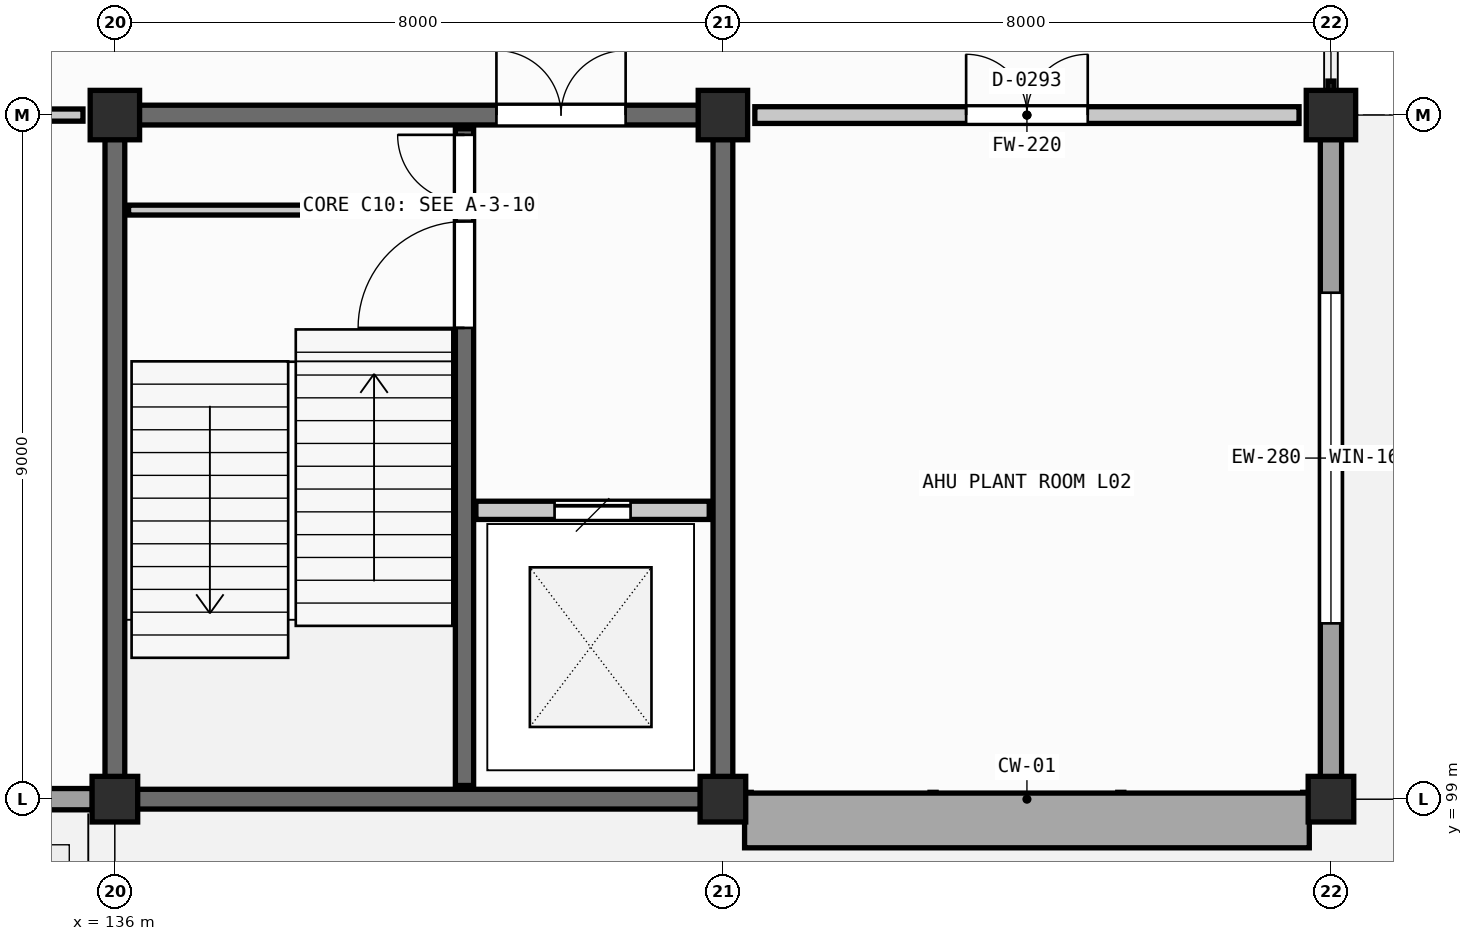
"""IFC4 building model, lengths in metres.
Left out: names, types, materials, properties, quantities, classifications, styles, units other than length and angle.
Written with IfcOpenShell. Run it as: python <this file> out.ifc"""

import sys

from ifc_helpers import new_model, si_unit, direction, frame, frame_2d, origin, origin_2d, place, context, subcontext, project, spatial, rectangle, extrude, element, fill, save


model = new_model("IFC4")
c1 = context("Model", 3, precision=1e-05, world=origin(), true_north=direction((0.0, 1.0)))
c2 = subcontext(c1, "Body", "Model", "MODEL_VIEW")
j1 = project(units=[si_unit("LENGTHUNIT", "METRE"), si_unit("PLANEANGLEUNIT", "RADIAN")], contexts=[c1])
p1 = place(None, origin())
s1 = spatial("IfcSite", under=j1, at=p1, CompositionType="ELEMENT")
p2 = place(p1, origin())
s2 = spatial("IfcBuilding", under=s1, at=p2, CompositionType="ELEMENT")
p3 = place(p2, frame((0.0, 0.0, 9.0)))
s3 = spatial("IfcBuildingStorey", under=s2, at=p3, CompositionType="ELEMENT", Elevation=9.0)
p4 = place(p3, frame((136.0, 99.0, 0.0), z_axis=(0.0, 0.0, 1.0), x_axis=(1.0, 0.0, 0.0)))
e1 = element("IfcColumn", 1, at=p4, inside=s3, PredefinedType="COLUMN", context=c2, shape_type="SweptSolid", body=[
    extrude(rectangle(XDim=0.6, YDim=0.6, at=origin_2d()), origin(), (0.0, 0.0, 1.0), 4.2),
])
p5 = place(p3, frame((136.0, 108.0, 0.0), z_axis=(0.0, 0.0, 1.0), x_axis=(1.0, 0.0, 0.0)))
e2 = element("IfcColumn", 2, at=p5, inside=s3, PredefinedType="COLUMN", context=c2, shape_type="SweptSolid", body=[
    extrude(rectangle(XDim=0.65, YDim=0.65, at=origin_2d()), origin(), (0.0, 0.0, 1.0), 4.2),
])
p6 = place(p3, frame((144.0, 99.0, 0.0), z_axis=(0.0, 0.0, 1.0), x_axis=(1.0, 0.0, 0.0)))
e3 = element("IfcColumn", 3, at=p6, inside=s3, PredefinedType="COLUMN", context=c2, shape_type="SweptSolid", body=[
    extrude(rectangle(XDim=0.6, YDim=0.6, at=origin_2d()), origin(), (0.0, 0.0, 1.0), 4.2),
])
p7 = place(p3, frame((144.0, 108.0, 0.0), z_axis=(0.0, 0.0, 1.0), x_axis=(1.0, 0.0, 0.0)))
e4 = element("IfcColumn", 4, at=p7, inside=s3, PredefinedType="COLUMN", context=c2, shape_type="SweptSolid", body=[
    extrude(rectangle(XDim=0.65, YDim=0.65, at=origin_2d()), origin(), (0.0, 0.0, 1.0), 4.2),
])
p8 = place(p3, frame((152.0, 99.0, 0.0), z_axis=(0.0, 0.0, 1.0), x_axis=(1.0, 0.0, 0.0)))
e5 = element("IfcColumn", 5, at=p8, inside=s3, PredefinedType="COLUMN", context=c2, shape_type="SweptSolid", body=[
    extrude(rectangle(XDim=0.6, YDim=0.6, at=origin_2d()), origin(), (0.0, 0.0, 1.0), 4.2),
])
p9 = place(p3, frame((152.0, 108.0, 0.0), z_axis=(0.0, 0.0, 1.0), x_axis=(1.0, 0.0, 0.0)))
e6 = element("IfcColumn", 6, at=p9, inside=s3, PredefinedType="COLUMN", context=c2, shape_type="SweptSolid", body=[
    extrude(rectangle(XDim=0.65, YDim=0.65, at=origin_2d()), origin(), (0.0, 0.0, 1.0), 4.2),
])
p10 = place(p3, frame((128.695, 99.0, 0.0), z_axis=(0.0, 0.0, 1.0), x_axis=(1.0, 0.0, 0.0)))
e7 = element("IfcWall", 7, at=p10, inside=s3, PredefinedType="SOLIDWALL", context=c2, shape_type="SweptSolid", body=[
    extrude(rectangle(XDim=7.01, YDim=0.28, at=frame_2d((3.505, 0.0))), origin(), (0.0, 0.0, 1.0), 3.05),
])
p11 = place(p10, frame((2.68, 0.0, 0.0)))
e8 = element("IfcOpeningElement", 8, at=p11, cuts=e7, PredefinedType="OPENING", context=c2, shape_type="SweptSolid", body=[
    extrude(rectangle(XDim=1.65, YDim=2.2, at=frame_2d((0.825, 1.1))), frame((0.0, 0.15, 0.0), z_axis=(0.0, -1.0, 0.0), x_axis=(1.0, 0.0, 0.0)), (0.0, 0.0, 1.0), 0.3),
])
p12 = place(p3, frame((152.0, 99.295, 0.0), z_axis=(0.0, 0.0, 1.0), x_axis=(0.0, 1.0, 0.0)))
e9 = element("IfcWall", 9, at=p12, inside=s3, PredefinedType="SOLIDWALL", context=c2, shape_type="SweptSolid", body=[
    extrude(rectangle(XDim=8.385, YDim=0.28, at=frame_2d((4.192, 0.0))), origin(), (0.0, 0.0, 1.0), 3.05),
])
p13 = place(p12, frame((2.018, 0.0, 1.0)))
e10 = element("IfcOpeningElement", 10, at=p13, cuts=e9, PredefinedType="OPENING", context=c2, shape_type="SweptSolid", body=[
    extrude(rectangle(XDim=4.35, YDim=1.45, at=frame_2d((2.175, 0.725))), frame((0.0, 0.15, 0.0), z_axis=(0.0, -1.0, 0.0), x_axis=(1.0, 0.0, 0.0)), (0.0, 0.0, 1.0), 0.3),
])
p14 = place(p3, frame((136.295, 99.0, 0.0), z_axis=(0.0, 0.0, 1.0), x_axis=(1.0, 0.0, 0.0)))
e11 = element("IfcWall", 11, at=p14, inside=s3, PredefinedType="SHEAR", context=c2, shape_type="SweptSolid", body=[
    extrude(rectangle(XDim=7.41, YDim=0.26, at=frame_2d((3.705, 0.0))), origin(), (0.0, 0.0, 1.0), 3.985),
])
p15 = place(p3, frame((136.32, 108.0, 0.0), z_axis=(0.0, 0.0, 1.0), x_axis=(1.0, 0.0, 0.0)))
e12 = element("IfcWall", 12, at=p15, inside=s3, PredefinedType="SHEAR", context=c2, shape_type="SweptSolid", body=[
    extrude(rectangle(XDim=7.36, YDim=0.26, at=frame_2d((3.68, 0.0))), origin(), (0.0, 0.0, 1.0), 3.985),
])
p16 = place(p15, frame((4.7, 0.0, 0.0)))
e13 = element("IfcOpeningElement", 13, at=p16, cuts=e12, PredefinedType="OPENING", context=c2, shape_type="SweptSolid", body=[
    extrude(rectangle(XDim=1.7, YDim=2.25, at=frame_2d((0.85, 1.125))), frame((0.0, 0.14, 0.0), z_axis=(0.0, -1.0, 0.0), x_axis=(1.0, 0.0, 0.0)), (0.0, 0.0, 1.0), 0.28),
])
for number, where, z_axis, x_axis in (
    (14, (136.0, 99.295, 0.0), (0.0, 0.0, 1.0), (0.0, 1.0, 0.0)),
    (15, (144.0, 99.295, 0.0), (0.0, 0.0, 1.0), (0.0, 1.0, 0.0)),
):
    element("IfcWall", number, at=place(p3, frame(where, z_axis=z_axis, x_axis=x_axis)), inside=s3, PredefinedType="SHEAR", context=c2, shape_type="SweptSolid", body=[
        extrude(rectangle(XDim=8.385, YDim=0.26, at=frame_2d((4.192, 0.0))), origin(), (0.0, 0.0, 1.0), 3.985),
    ])
p17 = place(p3, frame((140.6, 99.18, 0.0), z_axis=(0.0, 0.0, 1.0), x_axis=(0.0, 1.0, 0.0)))
e16 = element("IfcWall", 16, at=p17, inside=s3, PredefinedType="SHEAR", context=c2, shape_type="SweptSolid", body=[
    extrude(rectangle(XDim=8.64, YDim=0.24, at=frame_2d((4.32, 0.0))), origin(), (0.0, 0.0, 1.0), 3.985),
])
p18 = place(p17, frame((6.02, 0.0, 0.0)))
e17 = element("IfcOpeningElement", 17, at=p18, cuts=e16, PredefinedType="OPENING", context=c2, shape_type="SweptSolid", body=[
    extrude(rectangle(XDim=1.4, YDim=2.2, at=frame_2d((0.7, 1.1))), frame((0.0, 0.13, 0.0), z_axis=(0.0, -1.0, 0.0), x_axis=(1.0, 0.0, 0.0)), (0.0, 0.0, 1.0), 0.26),
])
p19 = place(p17, frame((7.68, 0.0, 0.0)))
e18 = element("IfcOpeningElement", 18, at=p19, cuts=e16, PredefinedType="OPENING", context=c2, shape_type="SweptSolid", body=[
    extrude(rectangle(XDim=0.88, YDim=2.02, at=frame_2d((0.44, 1.01))), frame((0.0, 0.13, 0.0), z_axis=(0.0, -1.0, 0.0), x_axis=(1.0, 0.0, 0.0)), (0.0, 0.0, 1.0), 0.26),
])
p20 = place(p3, frame((136.18, 106.75, 0.0), z_axis=(0.0, 0.0, 1.0), x_axis=(1.0, 0.0, 0.0)))
e19 = element("IfcWall", 19, at=p20, inside=s3, PredefinedType="PARTITIONING", context=c2, shape_type="SweptSolid", body=[
    extrude(rectangle(XDim=4.28, YDim=0.13, at=frame_2d((2.14, 0.0))), origin(), (0.0, 0.0, 1.0), 3.335),
])
p21 = place(p3, frame((140.75, 102.8, 0.0), z_axis=(0.0, 0.0, 1.0), x_axis=(1.0, 0.0, 0.0)))
e20 = element("IfcWall", 20, at=p21, inside=s3, PredefinedType="SHEAR", context=c2, shape_type="SweptSolid", body=[
    extrude(rectangle(XDim=3.07, YDim=0.24, at=frame_2d((1.535, 0.0))), origin(), (0.0, 0.0, 1.0), 3.335),
])
p22 = place(p21, frame((1.035, 0.0, 0.0)))
e21 = element("IfcOpeningElement", 21, at=p22, cuts=e20, PredefinedType="OPENING", context=c2, shape_type="SweptSolid", body=[
    extrude(rectangle(XDim=1.0, YDim=2.15, at=frame_2d((0.5, 1.075))), frame((0.0, 0.13, 0.0), z_axis=(0.0, -1.0, 0.0), x_axis=(1.0, 0.0, 0.0)), (0.0, 0.0, 1.0), 0.26),
])
p23 = place(p3, frame((128.82, 108.0, 0.0), z_axis=(0.0, 0.0, 1.0), x_axis=(1.0, 0.0, 0.0)))
e22 = element("IfcWall", 22, at=p23, inside=s3, PredefinedType="PARTITIONING", context=c2, shape_type="SweptSolid", body=[
    extrude(rectangle(XDim=6.76, YDim=0.16, at=frame_2d((3.38, 0.0))), origin(), (0.0, 0.0, 1.0), 3.05),
])
p24 = place(p23, frame((2.63, 0.0, 0.0)))
e23 = element("IfcOpeningElement", 23, at=p24, cuts=e22, PredefinedType="OPENING", context=c2, shape_type="SweptSolid", body=[
    extrude(rectangle(XDim=1.5, YDim=2.15, at=frame_2d((0.75, 1.075))), frame((0.0, 0.09, 0.0), z_axis=(0.0, -1.0, 0.0), x_axis=(1.0, 0.0, 0.0)), (0.0, 0.0, 1.0), 0.18),
])
p25 = place(p3, frame((144.42, 108.0, 0.0), z_axis=(0.0, 0.0, 1.0), x_axis=(1.0, 0.0, 0.0)))
e24 = element("IfcWall", 24, at=p25, inside=s3, PredefinedType="SOLIDWALL", context=c2, shape_type="SweptSolid", body=[
    extrude(rectangle(XDim=7.16, YDim=0.22, at=frame_2d((3.58, 0.0))), origin(), (0.0, 0.0, 1.0), 3.05),
])
p26 = place(p25, frame((2.78, 0.0, 0.0)))
e25 = element("IfcOpeningElement", 25, at=p26, cuts=e24, PredefinedType="OPENING", context=c2, shape_type="SweptSolid", body=[
    extrude(rectangle(XDim=1.6, YDim=2.28, at=frame_2d((0.8, 1.14))), frame((0.0, 0.12, 0.0), z_axis=(0.0, -1.0, 0.0), x_axis=(1.0, 0.0, 0.0)), (0.0, 0.0, 1.0), 0.24),
])
p27 = place(p13, origin())
e26 = element("IfcWindow", 26, at=p27, inside=s3, PartitioningType="SINGLE_PANEL", PredefinedType="WINDOW", context=c2, shape_type="SweptSolid", body=[
    extrude(rectangle(XDim=4.35, YDim=1.45, at=frame_2d((2.175, 0.725))), frame((0.0, 0.03, 0.0), z_axis=(0.0, -1.0, 0.0), x_axis=(1.0, 0.0, 0.0)), (0.0, 0.0, 1.0), 0.06),
])
fill(e10, e26)
p28 = place(p18, origin())
e27 = element("IfcDoor", 27, at=p28, inside=s3, OperationType="SINGLE_SWING_LEFT", PredefinedType="DOOR", context=c2, shape_type="SweptSolid", body=[
    extrude(rectangle(XDim=1.4, YDim=2.2, at=frame_2d((0.7, 1.1))), frame((0.0, 0.025, 0.0), z_axis=(0.0, -1.0, 0.0), x_axis=(1.0, 0.0, 0.0)), (0.0, 0.0, 1.0), 0.05),
])
fill(e17, e27)
p29 = place(p19, origin())
e28 = element("IfcDoor", 28, at=p29, inside=s3, OperationType="SINGLE_SWING_RIGHT", PredefinedType="DOOR", context=c2, shape_type="SweptSolid", body=[
    extrude(rectangle(XDim=0.88, YDim=2.02, at=frame_2d((0.44, 1.01))), frame((0.0, 0.025, 0.0), z_axis=(0.0, -1.0, 0.0), x_axis=(1.0, 0.0, 0.0)), (0.0, 0.0, 1.0), 0.05),
])
fill(e18, e28)
p30 = place(p16, origin())
e29 = element("IfcDoor", 29, at=p30, inside=s3, OperationType="DOUBLE_DOOR_SINGLE_SWING", PredefinedType="DOOR", context=c2, shape_type="SweptSolid", body=[
    extrude(rectangle(XDim=1.7, YDim=2.25, at=frame_2d((0.85, 1.125))), frame((0.0, 0.025, 0.0), z_axis=(0.0, -1.0, 0.0), x_axis=(1.0, 0.0, 0.0)), (0.0, 0.0, 1.0), 0.05),
])
fill(e13, e29)
p31 = place(p22, origin())
e30 = element("IfcDoor", 30, at=p31, inside=s3, OperationType="SLIDING_TO_LEFT", PredefinedType="DOOR", context=c2, shape_type="SweptSolid", body=[
    extrude(rectangle(XDim=1.0, YDim=2.15, at=frame_2d((0.5, 1.075))), frame((0.0, 0.025, 0.0), z_axis=(0.0, -1.0, 0.0), x_axis=(1.0, 0.0, 0.0)), (0.0, 0.0, 1.0), 0.05),
])
fill(e21, e30)
p32 = place(p26, origin())
e31 = element("IfcDoor", 31, at=p32, inside=s3, OperationType="DOUBLE_DOOR_SINGLE_SWING", PredefinedType="DOOR", context=c2, shape_type="SweptSolid", body=[
    extrude(rectangle(XDim=1.6, YDim=2.28, at=frame_2d((0.8, 1.14))), frame((0.0, 0.025, 0.0), z_axis=(0.0, -1.0, 0.0), x_axis=(1.0, 0.0, 0.0)), (0.0, 0.0, 1.0), 0.05),
])
fill(e25, e31)
save(model, sys.argv[1])
